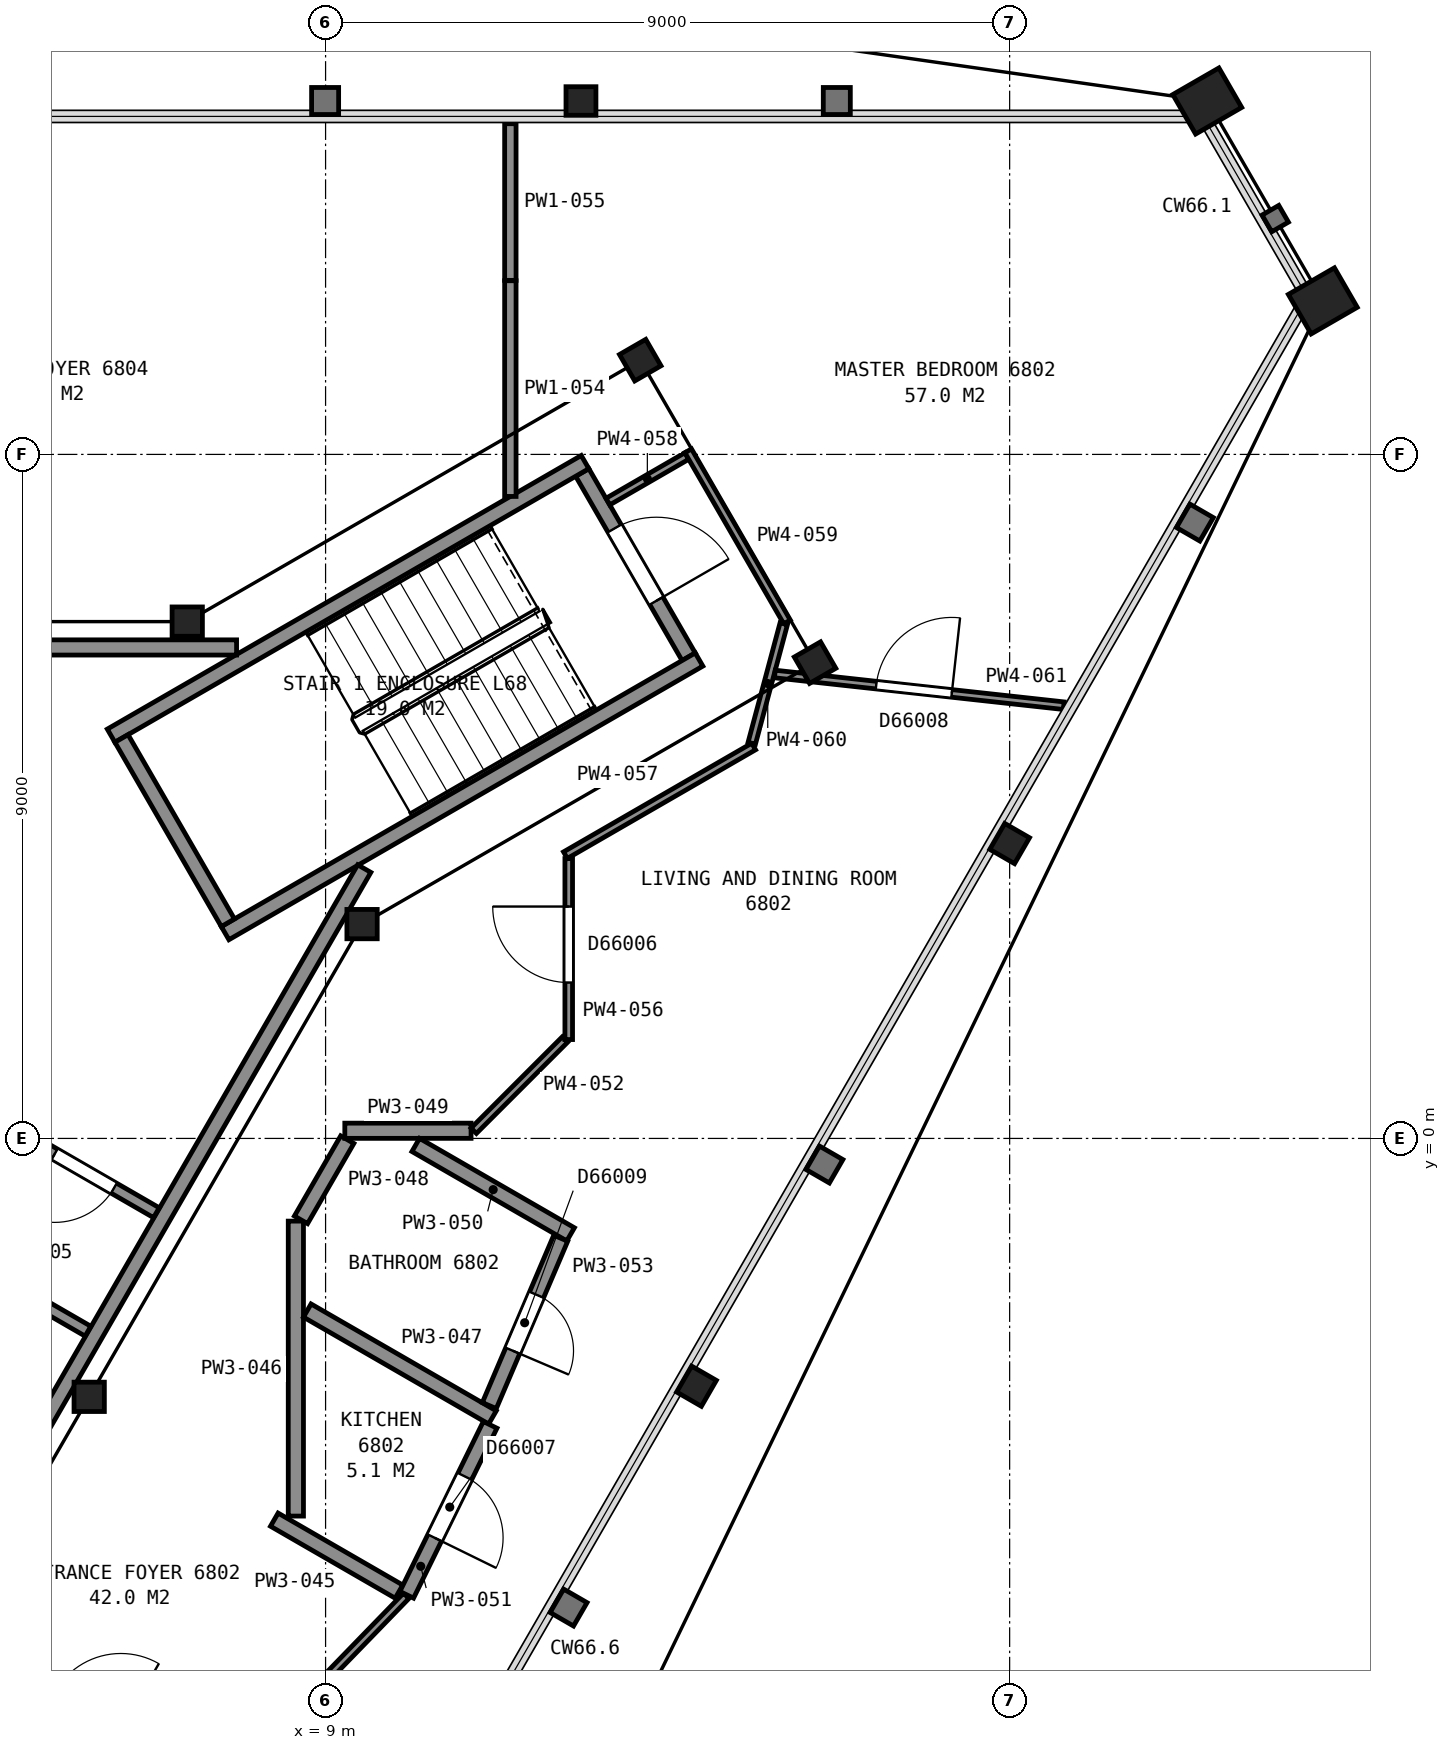
"""IFC4 building model, lengths in metres.
Left out: names, types, materials, properties, quantities, classifications, styles, units other than length and angle.
Written with IfcOpenShell. Run it as: python <this file> out.ifc"""

import sys

from ifc_helpers import new_model, si_unit, direction, frame, frame_2d, origin, origin_2d, place, context, subcontext, project, spatial, rectangle, hollow_rectangle, i_section, extrude, element, fill, save


model = new_model("IFC4")
c1 = context("Model", 3, precision=1e-05, world=origin(), true_north=direction((0.0, 1.0)))
c2 = subcontext(c1, "Body", "Model", "MODEL_VIEW")
j1 = project(units=[si_unit("LENGTHUNIT", "METRE"), si_unit("PLANEANGLEUNIT", "RADIAN")], contexts=[c1])
p1 = place(None, origin())
s1 = spatial("IfcSite", under=j1, at=p1, CompositionType="ELEMENT")
p2 = place(p1, origin())
s2 = spatial("IfcBuilding", under=s1, at=p2, CompositionType="ELEMENT")
p3 = place(p2, frame((0.0, 0.0, 271.4)))
s3 = spatial("IfcBuildingStorey", under=s2, at=p3, CompositionType="ELEMENT", Elevation=271.4)
p4 = place(p3, frame((20.6, 13.65, 0.0), z_axis=(0.0, 0.0, 1.0), x_axis=(0.5, -0.866025403784, 0.0)))
e1 = element("IfcColumn", 1, at=p4, inside=s3, PredefinedType="COLUMN", context=c2, shape_type="SweptSolid", body=[
    extrude(hollow_rectangle(XDim=0.6, YDim=0.7, WallThickness=0.04, at=origin_2d()), origin(), (0.0, 0.0, 1.0), 3.7),
])
for number, where, z_axis, x_axis in (
    (2, (12.36, 13.65, 0.0), (0.0, 0.0, 1.0), (1.0, 0.0, 0.0)),
    (3, (13.88, -3.26, 0.0), (0.0, 0.0, 1.0), (-0.5, -0.866, 0.0)),
    (4, (18.0, 3.88, 0.0), (0.0, 0.0, 1.0), (-0.5, -0.866, 0.0)),
):
    element("IfcColumn", number, at=place(p3, frame(where, z_axis=z_axis, x_axis=x_axis)), inside=s3, PredefinedType="COLUMN", context=c2, shape_type="SweptSolid", body=[
        extrude(i_section(OverallWidth=0.394, OverallDepth=0.376, WebThickness=0.017, FlangeThickness=0.028, FilletRadius=0.015, at=origin_2d()), origin(), (0.0, 0.0, 1.0), 3.7),
    ])
p5 = place(p3, frame((22.12, 11.02, 0.0), z_axis=(0.0, 0.0, 1.0), x_axis=(0.5, -0.866025403784, 0.0)))
e5 = element("IfcColumn", 5, at=p5, inside=s3, PredefinedType="COLUMN", context=c2, shape_type="SweptSolid", body=[
    extrude(hollow_rectangle(XDim=0.6, YDim=0.7, WallThickness=0.04, at=origin_2d()), origin(), (0.0, 0.0, 1.0), 3.7),
])
p6 = place(p3, frame((9.48, 2.82, 0.0), z_axis=(0.0, 0.0, 1.0), x_axis=(1.0, 0.0, 0.0)))
e6 = element("IfcColumn", 6, at=p6, inside=s3, PredefinedType="COLUMN", context=c2, shape_type="SweptSolid", body=[
    extrude(i_section(OverallWidth=0.399, OverallDepth=0.386, WebThickness=0.021, FlangeThickness=0.033, FilletRadius=0.015, at=origin_2d()), origin(), (0.0, 0.0, 1.0), 3.7),
])
for number, where, z_axis, x_axis in (
    (7, (15.44, 6.26, 0.0), (0.0, 0.0, 1.0), (0.5, -0.866, 0.0)),
    (8, (13.14, 10.24, 0.0), (0.0, 0.0, 1.0), (0.5, -0.866, 0.0)),
):
    element("IfcColumn", number, at=place(p3, frame(where, z_axis=z_axis, x_axis=x_axis)), inside=s3, PredefinedType="COLUMN", context=c2, shape_type="SweptSolid", body=[
        extrude(i_section(OverallWidth=0.401, OverallDepth=0.399, WebThickness=0.025, FlangeThickness=0.04, FilletRadius=0.015, at=origin_2d()), origin(), (0.0, 0.0, 1.0), 3.7),
    ])
for number, where, z_axis, x_axis in (
    (9, (7.18, 6.8, 0.0), (0.0, 0.0, 1.0), (1.0, 0.0, 0.0)),
    (10, (5.89, -3.4, 0.0), (0.0, 0.0, 1.0), (1.0, 0.0, 0.0)),
):
    element("IfcColumn", number, at=place(p3, frame(where, z_axis=z_axis, x_axis=x_axis)), inside=s3, PredefinedType="COLUMN", context=c2, shape_type="SweptSolid", body=[
        extrude(i_section(OverallWidth=0.399, OverallDepth=0.386, WebThickness=0.021, FlangeThickness=0.033, FilletRadius=0.015, at=origin_2d()), origin(), (0.0, 0.0, 1.0), 3.7),
    ])
p7 = place(p3, frame((13.777, 6.338, 0.0), z_axis=(0.0, 0.0, 1.0), x_axis=(-0.500049511043, 0.865996816683, 0.0)))
e11 = element("IfcWall", 11, at=p7, inside=s3, PredefinedType="PARTITIONING", context=c2, shape_type="SweptSolid", body=[
    extrude(rectangle(XDim=2.8, YDim=0.2, at=frame_2d((1.4, 0.0))), origin(), (0.0, 0.0, 1.0), 3.45),
])
p8 = place(p7, frame((0.85, 0.0, 0.0)))
e12 = element("IfcOpeningElement", 12, at=p8, cuts=e11, PredefinedType="OPENING", context=c2, shape_type="SweptSolid", body=[
    extrude(rectangle(XDim=1.1, YDim=2.1, at=frame_2d((0.55, 1.05))), frame((0.0, 0.11, 0.0), z_axis=(0.0, -1.0, 0.0), x_axis=(1.0, 0.0, 0.0)), (0.0, 0.0, 1.0), 0.22),
])
for number, where, z_axis, x_axis in (
    (13, (6.178, 5.299, 0.0), (0.0, 0.0, 1.0), (0.866, 0.5, 0.0)),
    (14, (7.678, 2.701, 0.0), (0.0, 0.0, 1.0), (0.866, 0.5, 0.0)),
):
    element("IfcWall", number, at=place(p3, frame(where, z_axis=z_axis, x_axis=x_axis)), inside=s3, PredefinedType="PARTITIONING", context=c2, shape_type="SweptSolid", body=[
        extrude(rectangle(XDim=7.2, YDim=0.2, at=frame_2d((3.6, 0.0))), origin(), (0.0, 0.0, 1.0), 3.45),
    ])
p9 = place(p3, frame((7.715, 2.838, 0.0), z_axis=(0.0, 0.0, 1.0), x_axis=(-0.500049511043, 0.865996816683, 0.0)))
e15 = element("IfcWall", 15, at=p9, inside=s3, PredefinedType="PARTITIONING", context=c2, shape_type="SweptSolid", body=[
    extrude(rectangle(XDim=2.8, YDim=0.2, at=frame_2d((1.4, 0.0))), origin(), (0.0, 0.0, 1.0), 3.45),
])
p10 = place(p3, frame((7.829, 6.46, 0.0), z_axis=(0.0, 0.0, 1.0), x_axis=(-1.0, 0.0, 0.0)))
e16 = element("IfcWall", 16, at=p10, inside=s3, PredefinedType="PARTITIONING", context=c2, shape_type="SweptSolid", body=[
    extrude(rectangle(XDim=15.658, YDim=0.2, at=frame_2d((7.829, 0.0))), origin(), (0.0, 0.0, 1.0), 3.45),
])
p11 = place(p10, frame((12.168, 0.0, 0.0)))
e17 = element("IfcOpeningElement", 17, at=p11, cuts=e16, PredefinedType="OPENING", context=c2, shape_type="SweptSolid", body=[
    extrude(rectangle(XDim=1.2, YDim=2.1, at=frame_2d((0.6, 1.05))), frame((0.0, 0.11, 0.0), z_axis=(0.0, -1.0, 0.0), x_axis=(1.0, 0.0, 0.0)), (0.0, 0.0, 1.0), 0.22),
])
p12 = place(p3, frame((3.828, -6.29, 0.0), z_axis=(0.0, 0.0, 1.0), x_axis=(0.499979739078, 0.866037101117, 0.0)))
e18 = element("IfcWall", 18, at=p12, inside=s3, PredefinedType="PARTITIONING", context=c2, shape_type="SweptSolid", body=[
    extrude(rectangle(XDim=11.363, YDim=0.2, at=frame_2d((5.681, 0.0))), origin(), (0.0, 0.0, 1.0), 3.45),
])
p13 = place(p12, frame((0.55, 0.0, 0.0)))
e19 = element("IfcOpeningElement", 19, at=p13, cuts=e18, PredefinedType="OPENING", context=c2, shape_type="SweptSolid", body=[
    extrude(rectangle(XDim=1.2, YDim=2.1, at=frame_2d((0.6, 1.05))), frame((0.0, 0.11, 0.0), z_axis=(0.0, -1.0, 0.0), x_axis=(1.0, 0.0, 0.0)), (0.0, 0.0, 1.0), 0.22),
])
p14 = place(p3, frame((3.951, -1.427, 0.0), z_axis=(0.0, 0.0, 1.0), x_axis=(0.866062920605, -0.499935013329, 0.0)))
e20 = element("IfcWall", 20, at=p14, inside=s3, PredefinedType="PARTITIONING", context=c2, shape_type="SweptSolid", body=[
    extrude(rectangle(XDim=2.22, YDim=0.15, at=frame_2d((1.11, 0.0))), origin(), (0.0, 0.0, 1.0), 3.45),
])
p15 = place(p3, frame((6.774, -0.978, 0.0), z_axis=(0.0, 0.0, 1.0), x_axis=(-0.866062920605, 0.499935013329, 0.0)))
e21 = element("IfcWall", 21, at=p15, inside=s3, PredefinedType="PARTITIONING", context=c2, shape_type="SweptSolid", body=[
    extrude(rectangle(XDim=2.22, YDim=0.15, at=frame_2d((1.11, 0.0))), origin(), (0.0, 0.0, 1.0), 3.45),
])
p16 = place(p15, frame((0.646, 0.0, 0.0)))
e22 = element("IfcOpeningElement", 22, at=p16, cuts=e21, PredefinedType="OPENING", context=c2, shape_type="SweptSolid", body=[
    extrude(rectangle(XDim=0.9, YDim=2.1, at=frame_2d((0.45, 1.05))), frame((0.0, 0.085, 0.0), z_axis=(0.0, -1.0, 0.0), x_axis=(1.0, 0.0, 0.0)), (0.0, 0.0, 1.0), 0.17),
])
p17 = place(p3, frame((9.772, -9.777, 0.0), z_axis=(0.0, 0.0, 1.0), x_axis=(-0.866083818164, 0.499898809675, 0.0)))
e23 = element("IfcWall", 23, at=p17, inside=s3, PredefinedType="PARTITIONING", context=c2, shape_type="SweptSolid", body=[
    extrude(rectangle(XDim=6.551, YDim=0.15, at=frame_2d((3.275, 0.0))), origin(), (0.0, 0.0, 1.0), 2.723),
])
p18 = place(p17, frame((4.001, 0.0, 0.0)))
e24 = element("IfcOpeningElement", 24, at=p18, cuts=e23, PredefinedType="OPENING", context=c2, shape_type="SweptSolid", body=[
    extrude(rectangle(XDim=1.0, YDim=2.1, at=frame_2d((0.5, 1.05))), frame((0.0, 0.085, 0.0), z_axis=(0.0, -1.0, 0.0), x_axis=(1.0, 0.0, 0.0)), (0.0, 0.0, 1.0), 0.17),
])
p19 = place(p3, frame((7.682, -8.47, 0.0), z_axis=(0.0, 0.0, 1.0), x_axis=(0.696344433623, 0.717707760696, 0.0)))
e25 = element("IfcWall", 25, at=p19, inside=s3, PredefinedType="PARTITIONING", context=c2, shape_type="SweptSolid", body=[
    extrude(rectangle(XDim=3.417, YDim=0.1, at=frame_2d((1.708, 0.0))), origin(), (0.0, 0.0, 1.0), 2.723),
])
p20 = place(p3, frame((8.325, -5.016, 0.0), z_axis=(0.0, 0.0, 1.0), x_axis=(0.866093293964, -0.499882392319, 0.0)))
e26 = element("IfcWall", 26, at=p20, inside=s3, PredefinedType="PARTITIONING", context=c2, shape_type="SweptSolid", body=[
    extrude(rectangle(XDim=1.894, YDim=0.2, at=frame_2d((0.947, 0.0))), origin(), (0.0, 0.0, 1.0), 2.723),
])
p21 = place(p3, frame((8.609, -4.969, 0.0), z_axis=(0.0, 0.0, 1.0), x_axis=(0.0, 1.0, 0.0)))
e27 = element("IfcWall", 27, at=p21, inside=s3, PredefinedType="PARTITIONING", context=c2, shape_type="SweptSolid", body=[
    extrude(rectangle(XDim=3.881, YDim=0.2, at=frame_2d((1.94, 0.0))), origin(), (0.0, 0.0, 1.0), 2.723),
])
p22 = place(p3, frame((8.759, -2.265, 0.0), z_axis=(0.0, 0.0, 1.0), x_axis=(0.866098885879, -0.499872703674, 0.0)))
e28 = element("IfcWall", 28, at=p22, inside=s3, PredefinedType="PARTITIONING", context=c2, shape_type="SweptSolid", body=[
    extrude(rectangle(XDim=2.813, YDim=0.2, at=frame_2d((1.407, 0.0))), origin(), (0.0, 0.0, 1.0), 2.723),
])
p23 = place(p3, frame((8.677, -1.071, 0.0), z_axis=(0.0, 0.0, 1.0), x_axis=(0.499803412959, 0.86613887362, 0.0)))
e29 = element("IfcWall", 29, at=p23, inside=s3, PredefinedType="PARTITIONING", context=c2, shape_type="SweptSolid", body=[
    extrude(rectangle(XDim=1.218, YDim=0.2, at=frame_2d((0.609, 0.0))), origin(), (0.0, 0.0, 1.0), 2.723),
])
p24 = place(p3, frame((9.253, 0.101, 0.0), z_axis=(0.0, 0.0, 1.0), x_axis=(1.0, 0.0, 0.0)))
e30 = element("IfcWall", 30, at=p24, inside=s3, PredefinedType="PARTITIONING", context=c2, shape_type="SweptSolid", body=[
    extrude(rectangle(XDim=1.661, YDim=0.2, at=frame_2d((0.831, 0.0))), origin(), (0.0, 0.0, 1.0), 2.723),
])
p25 = place(p3, frame((10.186, -0.086, 0.0), z_axis=(0.0, 0.0, 1.0), x_axis=(0.866024864377, -0.50000093428, 0.0)))
e31 = element("IfcWall", 31, at=p25, inside=s3, PredefinedType="PARTITIONING", context=c2, shape_type="SweptSolid", body=[
    extrude(rectangle(XDim=2.353, YDim=0.2, at=frame_2d((1.176, 0.0))), origin(), (0.0, 0.0, 1.0), 2.723),
])
p26 = place(p3, frame((10.068, -6.005, 0.0), z_axis=(0.0, 0.0, 1.0), x_axis=(0.440614307878, 0.897696514248, 0.0)))
e32 = element("IfcWall", 32, at=p26, inside=s3, PredefinedType="PARTITIONING", context=c2, shape_type="SweptSolid", body=[
    extrude(rectangle(XDim=2.491, YDim=0.2, at=frame_2d((1.245, 0.0))), origin(), (0.0, 0.0, 1.0), 2.723),
])
p27 = place(p26, frame((0.835, 0.0, 0.0)))
e33 = element("IfcOpeningElement", 33, at=p27, cuts=e32, PredefinedType="OPENING", context=c2, shape_type="SweptSolid", body=[
    extrude(rectangle(XDim=0.9, YDim=2.1, at=frame_2d((0.45, 1.05))), frame((0.0, 0.11, 0.0), z_axis=(0.0, -1.0, 0.0), x_axis=(1.0, 0.0, 0.0)), (0.0, 0.0, 1.0), 0.22),
])
p28 = place(p3, frame((10.949, 0.101, 0.0), z_axis=(0.0, 0.0, 1.0), x_axis=(0.707106781187, 0.707106781187, 0.0)))
e34 = element("IfcWall", 34, at=p28, inside=s3, PredefinedType="PARTITIONING", context=c2, shape_type="SweptSolid", body=[
    extrude(rectangle(XDim=1.698, YDim=0.1, at=frame_2d((0.849, 0.0))), origin(), (0.0, 0.0, 1.0), 2.723),
])
p29 = place(p3, frame((11.154, -3.515, 0.0), z_axis=(0.0, 0.0, 1.0), x_axis=(0.392515754301, 0.919745281383, 0.0)))
e35 = element("IfcWall", 35, at=p29, inside=s3, PredefinedType="PARTITIONING", context=c2, shape_type="SweptSolid", body=[
    extrude(rectangle(XDim=2.394, YDim=0.2, at=frame_2d((1.197, 0.0))), origin(), (0.0, 0.0, 1.0), 2.723),
])
p30 = place(p29, frame((0.785, 0.0, 0.0)))
e36 = element("IfcOpeningElement", 36, at=p30, cuts=e35, PredefinedType="OPENING", context=c2, shape_type="SweptSolid", body=[
    extrude(rectangle(XDim=0.8, YDim=2.1, at=frame_2d((0.4, 1.05))), frame((0.0, 0.11, 0.0), z_axis=(0.0, -1.0, 0.0), x_axis=(1.0, 0.0, 0.0)), (0.0, 0.0, 1.0), 0.22),
])
p31 = place(p3, frame((11.431, 8.447, 0.0), z_axis=(0.0, 0.0, 1.0), x_axis=(0.0, 1.0, 0.0)))
e37 = element("IfcWall", 37, at=p31, inside=s3, PredefinedType="PARTITIONING", context=c2, shape_type="SweptSolid", body=[
    extrude(rectangle(XDim=2.838, YDim=0.15, at=frame_2d((1.419, 0.0))), origin(), (0.0, 0.0, 1.0), 2.723),
])
p32 = place(p3, frame((11.431, 11.29, 0.0), z_axis=(0.0, 0.0, 1.0), x_axis=(0.0, 1.0, 0.0)))
e38 = element("IfcWall", 38, at=p32, inside=s3, PredefinedType="PARTITIONING", context=c2, shape_type="SweptSolid", body=[
    extrude(rectangle(XDim=2.061, YDim=0.15, at=frame_2d((1.031, 0.0))), origin(), (0.0, 0.0, 1.0), 2.723),
])
p33 = place(p3, frame((12.199, 3.682, 0.0), z_axis=(0.0, 0.0, 1.0), x_axis=(0.0, -1.0, 0.0)))
e39 = element("IfcWall", 39, at=p33, inside=s3, PredefinedType="PARTITIONING", context=c2, shape_type="SweptSolid", body=[
    extrude(rectangle(XDim=2.381, YDim=0.1, at=frame_2d((1.19, 0.0))), origin(), (0.0, 0.0, 1.0), 2.723),
])
p34 = place(p33, frame((0.631, 0.0, 0.0)))
e40 = element("IfcOpeningElement", 40, at=p34, cuts=e39, PredefinedType="OPENING", context=c2, shape_type="SweptSolid", body=[
    extrude(rectangle(XDim=1.0, YDim=2.1, at=frame_2d((0.5, 1.05))), frame((0.0, 0.06, 0.0), z_axis=(0.0, -1.0, 0.0), x_axis=(1.0, 0.0, 0.0)), (0.0, 0.0, 1.0), 0.12),
])
p35 = place(p3, frame((12.156, 3.727, 0.0), z_axis=(0.0, 0.0, 1.0), x_axis=(0.866012137121, 0.500022977831, 0.0)))
e41 = element("IfcWall", 41, at=p35, inside=s3, PredefinedType="PARTITIONING", context=c2, shape_type="SweptSolid", body=[
    extrude(rectangle(XDim=2.86, YDim=0.1, at=frame_2d((1.43, 0.0))), origin(), (0.0, 0.0, 1.0), 2.723),
])
p36 = place(p3, frame((12.714, 8.379, 0.0), z_axis=(0.0, 0.0, 1.0), x_axis=(0.86585331735, 0.500297944063, 0.0)))
e42 = element("IfcWall", 42, at=p36, inside=s3, PredefinedType="PARTITIONING", context=c2, shape_type="SweptSolid", body=[
    extrude(rectangle(XDim=1.199, YDim=0.1, at=frame_2d((0.6, 0.0))), origin(), (0.0, 0.0, 1.0), 2.723),
])
p37 = place(p3, frame((13.771, 9.047, 0.0), z_axis=(0.0, 0.0, 1.0), x_axis=(0.500006934395, -0.866021400173, 0.0)))
e43 = element("IfcWall", 43, at=p37, inside=s3, PredefinedType="PARTITIONING", context=c2, shape_type="SweptSolid", body=[
    extrude(rectangle(XDim=2.6, YDim=0.1, at=frame_2d((1.3, 0.0))), origin(), (0.0, 0.0, 1.0), 2.723),
])
p38 = place(p3, frame((14.607, 5.2, 0.0), z_axis=(0.0, 0.0, 1.0), x_axis=(0.258531076101, 0.966002941346, 0.0)))
e44 = element("IfcWall", 44, at=p38, inside=s3, PredefinedType="PARTITIONING", context=c2, shape_type="SweptSolid", body=[
    extrude(rectangle(XDim=1.627, YDim=0.1, at=frame_2d((0.813, 0.0))), origin(), (0.0, 0.0, 1.0), 2.723),
])
p39 = place(p3, frame((14.911, 6.111, 0.0), z_axis=(0.0, 0.0, 1.0), x_axis=(0.994040808037, -0.10900858662, 0.0)))
e45 = element("IfcWall", 45, at=p39, inside=s3, PredefinedType="PARTITIONING", context=c2, shape_type="SweptSolid", body=[
    extrude(rectangle(XDim=3.823, YDim=0.1, at=frame_2d((1.912, 0.0))), origin(), (0.0, 0.0, 1.0), 2.723),
])
p40 = place(p39, frame((1.342, 0.0, 0.0)))
e46 = element("IfcOpeningElement", 46, at=p40, cuts=e45, PredefinedType="OPENING", context=c2, shape_type="SweptSolid", body=[
    extrude(rectangle(XDim=1.0, YDim=2.1, at=frame_2d((0.5, 1.05))), frame((0.0, 0.06, 0.0), z_axis=(0.0, -1.0, 0.0), x_axis=(1.0, 0.0, 0.0)), (0.0, 0.0, 1.0), 0.12),
])
p41 = place(p8, origin())
e47 = element("IfcDoor", 47, at=p41, inside=s3, OperationType="SINGLE_SWING_LEFT", PredefinedType="DOOR", context=c2, shape_type="SweptSolid", body=[
    extrude(rectangle(XDim=1.1, YDim=2.1, at=frame_2d((0.55, 1.05))), frame((0.0, 0.025, 0.0), z_axis=(0.0, -1.0, 0.0), x_axis=(1.0, 0.0, 0.0)), (0.0, 0.0, 1.0), 0.05),
])
fill(e12, e47)
p42 = place(p16, origin())
e48 = element("IfcDoor", 48, at=p42, inside=s3, OperationType="SINGLE_SWING_RIGHT", PredefinedType="DOOR", context=c2, shape_type="SweptSolid", body=[
    extrude(rectangle(XDim=0.9, YDim=2.1, at=frame_2d((0.45, 1.05))), frame((0.0, 0.025, 0.0), z_axis=(0.0, -1.0, 0.0), x_axis=(1.0, 0.0, 0.0)), (0.0, 0.0, 1.0), 0.05),
])
fill(e22, e48)
p43 = place(p27, origin())
e49 = element("IfcDoor", 49, at=p43, inside=s3, OperationType="SINGLE_SWING_LEFT", PredefinedType="DOOR", context=c2, shape_type="SweptSolid", body=[
    extrude(rectangle(XDim=0.9, YDim=2.1, at=frame_2d((0.45, 1.05))), frame((0.0, 0.025, 0.0), z_axis=(0.0, -1.0, 0.0), x_axis=(1.0, 0.0, 0.0)), (0.0, 0.0, 1.0), 0.05),
])
fill(e33, e49)
p44 = place(p30, origin())
e50 = element("IfcDoor", 50, at=p44, inside=s3, OperationType="SINGLE_SWING_LEFT", PredefinedType="DOOR", context=c2, shape_type="SweptSolid", body=[
    extrude(rectangle(XDim=0.8, YDim=2.1, at=frame_2d((0.4, 1.05))), frame((0.0, 0.025, 0.0), z_axis=(0.0, -1.0, 0.0), x_axis=(1.0, 0.0, 0.0)), (0.0, 0.0, 1.0), 0.05),
])
fill(e36, e50)
p45 = place(p34, origin())
e51 = element("IfcDoor", 51, at=p45, inside=s3, OperationType="SINGLE_SWING_LEFT", PredefinedType="DOOR", context=c2, shape_type="SweptSolid", body=[
    extrude(rectangle(XDim=1.0, YDim=2.1, at=frame_2d((0.5, 1.05))), frame((0.0, 0.025, 0.0), z_axis=(0.0, -1.0, 0.0), x_axis=(1.0, 0.0, 0.0)), (0.0, 0.0, 1.0), 0.05),
])
fill(e40, e51)
p46 = place(p40, origin())
e52 = element("IfcDoor", 52, at=p46, inside=s3, OperationType="SINGLE_SWING_RIGHT", PredefinedType="DOOR", context=c2, shape_type="SweptSolid", body=[
    extrude(rectangle(XDim=1.0, YDim=2.1, at=frame_2d((0.5, 1.05))), frame((0.0, 0.025, 0.0), z_axis=(0.0, -1.0, 0.0), x_axis=(1.0, 0.0, 0.0)), (0.0, 0.0, 1.0), 0.05),
])
fill(e46, e52)
save(model, sys.argv[1])
